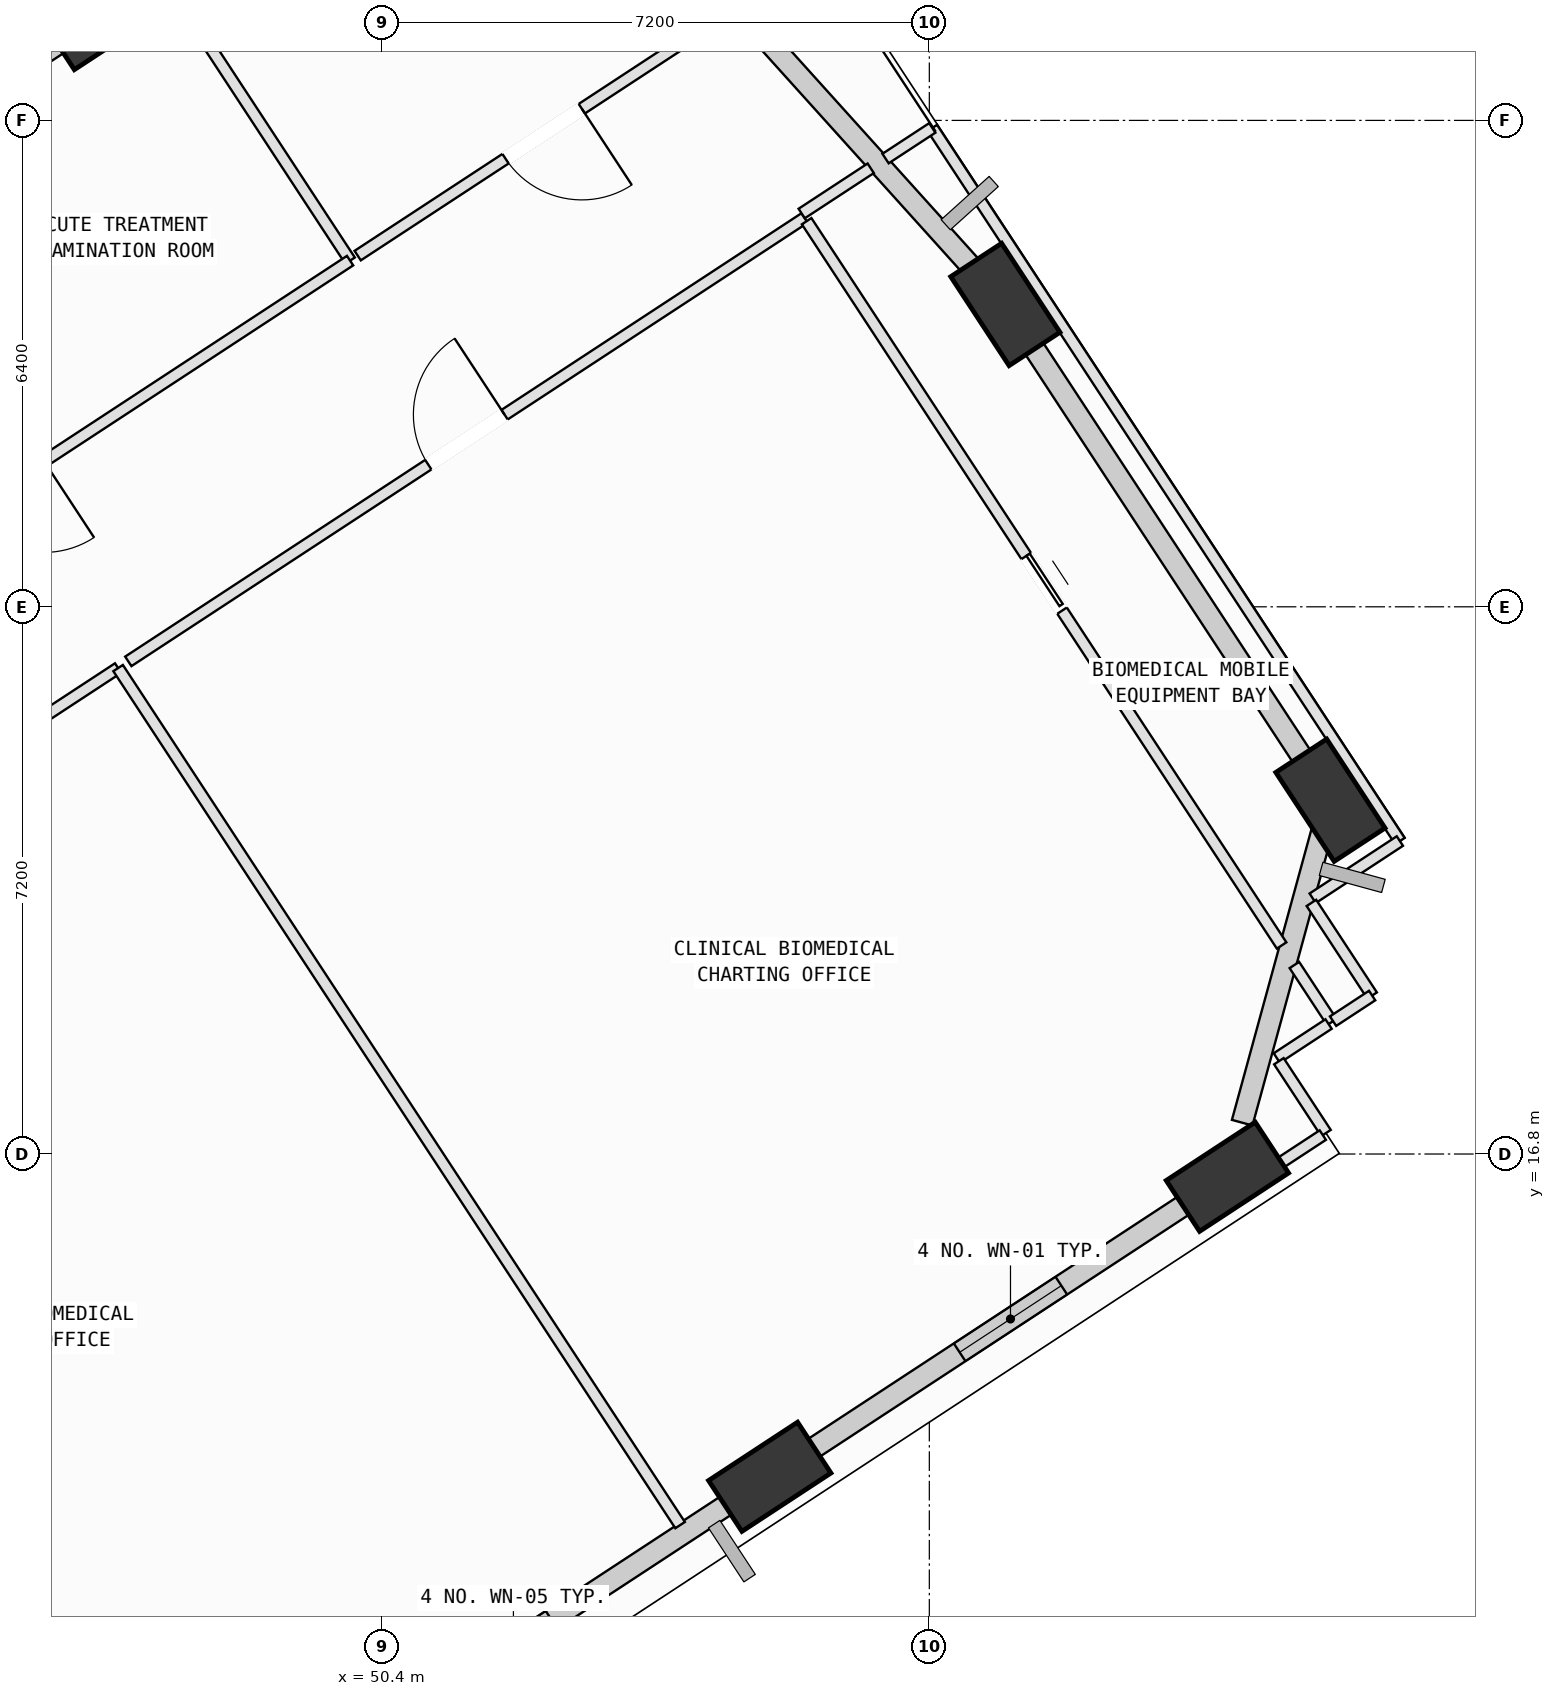
"""IFC4 building model, lengths in metres.
Left out: names, types, materials, properties, quantities, classifications, styles, units other than length and angle.
Written with IfcOpenShell. Run it as: python <this file> out.ifc"""

import sys

from ifc_helpers import new_model, si_unit, direction, frame, frame_2d, origin, origin_2d, place, context, subcontext, project, spatial, rectangle, extrude, element, fill, save


model = new_model("IFC4")
c1 = context("Model", 3, precision=1e-05, world=origin(), true_north=direction((0.0, 1.0)))
c2 = subcontext(c1, "Body", "Model", "MODEL_VIEW")
j1 = project(units=[si_unit("LENGTHUNIT", "METRE"), si_unit("PLANEANGLEUNIT", "RADIAN")], contexts=[c1])
p1 = place(None, origin())
s1 = spatial("IfcSite", under=j1, at=p1, CompositionType="ELEMENT")
p2 = place(p1, origin())
s2 = spatial("IfcBuilding", under=s1, at=p2, CompositionType="ELEMENT")
p3 = place(p2, frame((0.0, 0.0, 165.8)))
s3 = spatial("IfcBuildingStorey", under=s2, at=p3, CompositionType="ELEMENT", Elevation=165.8)
p4 = place(p3, frame((55.5, 12.553, 0.002), z_axis=(0.049765035184, 0.090719410903, 0.994632308825), x_axis=(-0.995498317814, -0.07592385374, 0.056733302946)))
e1 = element("IfcColumn", 1, at=p4, inside=s3, PredefinedType="COLUMN", context=c2, shape_type="SweptSolid", body=[
    extrude(rectangle(XDim=1.4, YDim=0.8, at=origin_2d()), origin(), (0.0, 0.0, 1.0), 4.018),
])
p5 = place(p3, frame((61.522, 16.501, 0.002), z_axis=(0.03323650567, 0.115175409247, 0.992788980497), x_axis=(-0.954422894609, -0.291130448803, 0.0657267071)))
e2 = element("IfcColumn", 2, at=p5, inside=s3, PredefinedType="COLUMN", context=c2, shape_type="SweptSolid", body=[
    extrude(rectangle(XDim=1.4, YDim=0.8, at=origin_2d()), origin(), (0.0, 0.0, 1.0), 4.025),
])
p6 = place(p3, frame((62.877, 21.455, 0.002), z_axis=(0.012795146098, 0.120553319632, 0.992624390876), x_axis=(0.457616826134, -0.883350587109, 0.101383335381)))
e3 = element("IfcColumn", 3, at=p6, inside=s3, PredefinedType="COLUMN", context=c2, shape_type="SweptSolid", body=[
    extrude(rectangle(XDim=1.4, YDim=0.8, at=origin_2d()), origin(), (0.0, 0.0, 1.0), 4.026),
])
p7 = place(p3, frame((58.601, 27.978, 0.002), z_axis=(-0.013974855089, 0.102988605982, 0.994584360657), x_axis=(0.65515298968, -0.750479814309, 0.086917250466)))
e4 = element("IfcColumn", 4, at=p7, inside=s3, PredefinedType="COLUMN", context=c2, shape_type="SweptSolid", body=[
    extrude(rectangle(XDim=1.4, YDim=0.8, at=origin_2d()), origin(), (0.0, 0.0, 1.0), 4.018),
])
p8 = place(p3, frame((46.717, 31.786, 0.002), z_axis=(-0.029390162986, 0.054024241505, 0.998107008116), x_axis=(-0.473093074248, -0.880366887856, 0.033720703821)))
e5 = element("IfcColumn", 5, at=p8, inside=s3, PredefinedType="COLUMN", context=c2, shape_type="SweptSolid", body=[
    extrude(rectangle(XDim=1.4, YDim=0.8, at=origin_2d()), origin(), (0.0, 0.0, 1.0), 4.004),
])
p9 = place(p3, frame((55.247, 12.387, 0.0), z_axis=(0.0, 0.0, 1.0), x_axis=(-0.836284210267, -0.548296197013, 0.0)))
e6 = element("IfcWall", 6, at=p9, inside=s3, PredefinedType="SOLIDWALL", context=c2, shape_type="SweptSolid", body=[
    extrude(rectangle(XDim=6.218, YDim=0.28, at=frame_2d((3.109, 0.0))), origin(), (0.0, 0.0, 1.0), 3.165),
])
p10 = place(p9, frame((3.13, 0.0, 0.75)))
e7 = element("IfcOpeningElement", 7, at=p10, cuts=e6, PredefinedType="OPENING", context=c2, shape_type="SweptSolid", body=[
    extrude(rectangle(XDim=1.2, YDim=1.75, at=frame_2d((0.6, 0.875))), frame((0.0, 0.15, 0.0), z_axis=(0.0, -1.0, 0.0), x_axis=(1.0, 0.0, 0.0)), (0.0, 0.0, 1.0), 0.3),
])
p11 = place(p3, frame((61.281, 16.343, 0.0), z_axis=(0.0, 0.0, 1.0), x_axis=(-0.836291699202, -0.548284774406, 0.0)))
e8 = element("IfcWall", 8, at=p11, inside=s3, PredefinedType="SOLIDWALL", context=c2, shape_type="SweptSolid", body=[
    extrude(rectangle(XDim=6.242, YDim=0.28, at=frame_2d((3.121, 0.0))), origin(), (0.0, 0.0, 1.0), 3.165),
])
p12 = place(p11, frame((2.325, 0.0, 0.75)))
e9 = element("IfcOpeningElement", 9, at=p12, cuts=e8, PredefinedType="OPENING", context=c2, shape_type="SweptSolid", body=[
    extrude(rectangle(XDim=1.6, YDim=1.95, at=frame_2d((0.8, 0.975))), frame((0.0, 0.15, 0.0), z_axis=(0.0, -1.0, 0.0), x_axis=(1.0, 0.0, 0.0)), (0.0, 0.0, 1.0), 0.3),
])
p13 = place(p3, frame((62.81, 21.21, 0.0), z_axis=(0.0, 0.0, 1.0), x_axis=(-0.263929675669, -0.964541925632, 0.0)))
e10 = element("IfcWall", 10, at=p13, inside=s3, PredefinedType="SOLIDWALL", context=c2, shape_type="SweptSolid", body=[
    extrude(rectangle(XDim=4.145, YDim=0.28, at=frame_2d((2.073, 0.0))), origin(), (0.0, 0.0, 1.0), 3.165),
])
p14 = place(p3, frame((58.765, 27.727, 0.0), z_axis=(0.0, 0.0, 1.0), x_axis=(0.548300082182, -0.836281663006, 0.0)))
e11 = element("IfcWall", 11, at=p14, inside=s3, PredefinedType="SOLIDWALL", context=c2, shape_type="SweptSolid", body=[
    extrude(rectangle(XDim=6.84, YDim=0.28, at=frame_2d((3.42, 0.0))), origin(), (0.0, 0.0, 1.0), 3.165),
])
p15 = place(p3, frame((52.244, 35.028, 0.0), z_axis=(0.0, 0.0, 1.0), x_axis=(0.669657355031, -0.742670200596, 0.0)))
e12 = element("IfcWall", 12, at=p15, inside=s3, PredefinedType="SOLIDWALL", context=c2, shape_type="SweptSolid", body=[
    extrude(rectangle(XDim=8.838, YDim=0.28, at=frame_2d((4.419, 0.0))), origin(), (0.0, 0.0, 1.0), 3.165),
])
p16 = place(p3, frame((44.206, 30.139, 0.0), z_axis=(0.0, 0.0, 1.0), x_axis=(0.836311759285, 0.548254175799, 0.0)))
e13 = element("IfcWall", 13, at=p16, inside=s3, PredefinedType="SOLIDWALL", context=c2, shape_type="SweptSolid", body=[
    extrude(rectangle(XDim=2.532, YDim=0.28, at=frame_2d((1.266, 0.0))), origin(), (0.0, 0.0, 1.0), 3.045),
])
p17 = place(p3, frame((41.23, 19.459, 0.0), z_axis=(0.0, 0.0, 1.0), x_axis=(0.836287739874, 0.548290813471, 0.0)))
e14 = element("IfcWall", 14, at=p17, inside=s3, PredefinedType="PARTITIONING", context=c2, shape_type="SweptSolid", body=[
    extrude(rectangle(XDim=6.812, YDim=0.15, at=frame_2d((3.406, 0.0))), origin(), (0.0, 0.0, 1.0), 3.065),
])
p18 = place(p17, frame((2.806, 0.0, 0.0)))
e15 = element("IfcOpeningElement", 15, at=p18, cuts=e14, PredefinedType="OPENING", context=c2, shape_type="SweptSolid", body=[
    extrude(rectangle(XDim=1.2, YDim=2.15, at=frame_2d((0.6, 1.075))), frame((0.0, 0.085, 0.0), z_axis=(0.0, -1.0, 0.0), x_axis=(1.0, 0.0, 0.0)), (0.0, 0.0, 1.0), 0.17),
])
p19 = place(p3, frame((46.927, 23.194, 0.0), z_axis=(0.0, 0.0, 1.0), x_axis=(0.54831669657, -0.836270769705, 0.0)))
e16 = element("IfcWall", 16, at=p19, inside=s3, PredefinedType="PARTITIONING", context=c2, shape_type="SweptSolid", body=[
    extrude(rectangle(XDim=13.485, YDim=0.15, at=frame_2d((6.743, 0.0))), origin(), (0.0, 0.0, 1.0), 3.415),
])
p20 = place(p3, frame((47.061, 23.282, 0.0), z_axis=(0.0, 0.0, 1.0), x_axis=(0.836276104337, 0.548308560315, 0.0)))
e17 = element("IfcWall", 17, at=p20, inside=s3, PredefinedType="PARTITIONING", context=c2, shape_type="SweptSolid", body=[
    extrude(rectangle(XDim=10.64, YDim=0.15, at=frame_2d((5.32, 0.0))), origin(), (0.0, 0.0, 1.0), 3.78),
])
p21 = place(p20, frame((4.72, 0.0, 0.0)))
e18 = element("IfcOpeningElement", 18, at=p21, cuts=e17, PredefinedType="OPENING", context=c2, shape_type="SweptSolid", body=[
    extrude(rectangle(XDim=1.2, YDim=2.15, at=frame_2d((0.6, 1.075))), frame((0.0, 0.085, 0.0), z_axis=(0.0, -1.0, 0.0), x_axis=(1.0, 0.0, 0.0)), (0.0, 0.0, 1.0), 0.17),
])
p22 = place(p3, frame((55.986, 29.074, 0.0), z_axis=(0.0, 0.0, 1.0), x_axis=(0.548346156001, -0.836251453332, 0.0)))
e19 = element("IfcWall", 19, at=p22, inside=s3, PredefinedType="PARTITIONING", context=c2, shape_type="SweptSolid", body=[
    extrude(rectangle(XDim=11.396, YDim=0.15, at=frame_2d((5.698, 0.0))), origin(), (0.0, 0.0, 1.0), 3.78),
])
p23 = place(p22, frame((5.268, 0.0, 0.0)))
e20 = element("IfcOpeningElement", 20, at=p23, cuts=e19, PredefinedType="OPENING", context=c2, shape_type="SweptSolid", body=[
    extrude(rectangle(XDim=0.86, YDim=2.06, at=frame_2d((0.43, 1.03))), frame((0.0, 0.085, 0.0), z_axis=(0.0, -1.0, 0.0), x_axis=(1.0, 0.0, 0.0)), (0.0, 0.0, 1.0), 0.17),
])
p24 = place(p3, frame((62.403, 19.287, 0.0), z_axis=(0.0, 0.0, 1.0), x_axis=(0.548466171821, -0.836172744335, 0.0)))
e21 = element("IfcWall", 21, at=p24, inside=s3, PredefinedType="PARTITIONING", context=c2, shape_type="SweptSolid", body=[
    extrude(rectangle(XDim=0.897, YDim=0.15, at=frame_2d((0.448, 0.0))), origin(), (0.0, 0.0, 1.0), 3.78),
])
p25 = place(p3, frame((62.853, 18.51, 0.0), z_axis=(0.0, 0.0, 1.0), x_axis=(-0.835949078194, -0.548807014046, 0.0)))
e22 = element("IfcWall", 22, at=p25, inside=s3, PredefinedType="PARTITIONING", context=c2, shape_type="SweptSolid", body=[
    extrude(rectangle(XDim=0.814, YDim=0.15, at=frame_2d((0.407, 0.0))), origin(), (0.0, 0.0, 1.0), 3.78),
])
p26 = place(p3, frame((62.199, 18.021, 0.0), z_axis=(0.0, 0.0, 1.0), x_axis=(0.548604544808, -0.836081965728, 0.0)))
e23 = element("IfcWall", 23, at=p26, inside=s3, PredefinedType="PARTITIONING", context=c2, shape_type="SweptSolid", body=[
    extrude(rectangle(XDim=1.13, YDim=0.15, at=frame_2d((0.565, 0.0))), origin(), (0.0, 0.0, 1.0), 3.78),
])
p27 = place(p3, frame((62.777, 17.049, 0.0), z_axis=(0.0, 0.0, 1.0), x_axis=(-0.836312696584, -0.548252746032, 0.0)))
e24 = element("IfcWall", 24, at=p27, inside=s3, PredefinedType="PARTITIONING", context=c2, shape_type="SweptSolid", body=[
    extrude(rectangle(XDim=1.638, YDim=0.15, at=frame_2d((0.819, 0.0))), origin(), (0.0, 0.0, 1.0), 3.78),
])
p28 = place(p3, frame((56.187, 12.728, 0.0), z_axis=(0.0, 0.0, 1.0), x_axis=(-0.836155745767, -0.54849208638, 0.0)))
e25 = element("IfcWall", 25, at=p28, inside=s3, PredefinedType="PARTITIONING", context=c2, shape_type="SweptSolid", body=[
    extrude(rectangle(XDim=0.973, YDim=0.15, at=frame_2d((0.487, 0.0))), origin(), (0.0, 0.0, 1.0), 3.165),
])
p29 = place(p3, frame((47.58, 32.214, 0.0), z_axis=(0.0, 0.0, 1.0), x_axis=(0.548271243698, -0.836300569971, 0.0)))
e26 = element("IfcWall", 26, at=p29, inside=s3, PredefinedType="PARTITIONING", context=c2, shape_type="SweptSolid", body=[
    extrude(rectangle(XDim=4.375, YDim=0.15, at=frame_2d((2.188, 0.0))), origin(), (0.0, 0.0, 1.0), 3.78),
])
p30 = place(p3, frame((49.979, 28.555, 0.0), z_axis=(0.0, 0.0, 1.0), x_axis=(-0.836298938049, -0.548273732927, 0.0)))
e27 = element("IfcWall", 27, at=p30, inside=s3, PredefinedType="PARTITIONING", context=c2, shape_type="SweptSolid", body=[
    extrude(rectangle(XDim=10.829, YDim=0.15, at=frame_2d((5.414, 0.0))), origin(), (0.0, 0.0, 1.0), 3.78),
])
p31 = place(p30, frame((4.814, 0.0, 0.0)))
e28 = element("IfcOpeningElement", 28, at=p31, cuts=e27, PredefinedType="OPENING", context=c2, shape_type="SweptSolid", body=[
    extrude(rectangle(XDim=1.2, YDim=2.15, at=frame_2d((0.6, 1.075))), frame((0.0, 0.085, 0.0), z_axis=(0.0, -1.0, 0.0), x_axis=(1.0, 0.0, 0.0)), (0.0, 0.0, 1.0), 0.17),
])
p32 = place(p3, frame((54.973, 31.829, 0.0), z_axis=(0.0, 0.0, 1.0), x_axis=(-0.836325905436, -0.548232596529, 0.0)))
e29 = element("IfcWall", 29, at=p32, inside=s3, PredefinedType="PARTITIONING", context=c2, shape_type="SweptSolid", body=[
    extrude(rectangle(XDim=5.852, YDim=0.15, at=frame_2d((2.926, 0.0))), origin(), (0.0, 0.0, 1.0), 3.78),
])
p33 = place(p32, frame((2.326, 0.0, 0.0)))
e30 = element("IfcOpeningElement", 30, at=p33, cuts=e29, PredefinedType="OPENING", context=c2, shape_type="SweptSolid", body=[
    extrude(rectangle(XDim=1.2, YDim=2.15, at=frame_2d((0.6, 1.075))), frame((0.0, 0.085, 0.0), z_axis=(0.0, -1.0, 0.0), x_axis=(1.0, 0.0, 0.0)), (0.0, 0.0, 1.0), 0.17),
])
p34 = place(p3, frame((57.639, 30.301, 0.0), z_axis=(0.0, 0.0, 1.0), x_axis=(0.548311811245, -0.83627397284, 0.0)))
e31 = element("IfcWall", 31, at=p34, inside=s3, PredefinedType="PARTITIONING", context=c2, shape_type="SweptSolid", body=[
    extrude(rectangle(XDim=11.22, YDim=0.15, at=frame_2d((5.61, 0.0))), origin(), (0.0, 0.0, 1.0), 3.165),
])
p35 = place(p3, frame((63.791, 20.918, 0.0), z_axis=(0.0, 0.0, 1.0), x_axis=(-0.835971381585, -0.548773039763, 0.0)))
e32 = element("IfcWall", 32, at=p35, inside=s3, PredefinedType="PARTITIONING", context=c2, shape_type="SweptSolid", body=[
    extrude(rectangle(XDim=1.372, YDim=0.15, at=frame_2d((0.686, 0.0))), origin(), (0.0, 0.0, 1.0), 3.78),
])
p36 = place(p3, frame((62.627, 20.104, 0.0), z_axis=(0.0, 0.0, 1.0), x_axis=(0.548228300685, -0.836328721454, 0.0)))
e33 = element("IfcWall", 33, at=p36, inside=s3, PredefinedType="PARTITIONING", context=c2, shape_type="SweptSolid", body=[
    extrude(rectangle(XDim=1.458, YDim=0.15, at=frame_2d((0.729, 0.0))), origin(), (0.0, 0.0, 1.0), 3.78),
])
p37 = place(p3, frame((63.426, 18.885, 0.0), z_axis=(0.0, 0.0, 1.0), x_axis=(-0.836304094671, -0.548265867291, 0.0)))
e34 = element("IfcWall", 34, at=p37, inside=s3, PredefinedType="PARTITIONING", context=c2, shape_type="SweptSolid", body=[
    extrude(rectangle(XDim=0.615, YDim=0.15, at=frame_2d((0.307, 0.0))), origin(), (0.0, 0.0, 1.0), 3.78),
])
p38 = place(p3, frame((55.921, 29.175, 0.0), z_axis=(0.0, 0.0, 1.0), x_axis=(0.836486009436, 0.547988280913, 0.0)))
e35 = element("IfcWall", 35, at=p38, inside=s3, PredefinedType="PARTITIONING", context=c2, shape_type="SweptSolid", body=[
    extrude(rectangle(XDim=1.086, YDim=0.15, at=frame_2d((0.543, 0.0))), origin(), (0.0, 0.0, 1.0), 3.78),
])
p39 = place(p3, frame((57.024, 29.898, 0.0), z_axis=(0.0, 0.0, 1.0), x_axis=(0.836366647965, 0.54817043898, 0.0)))
e36 = element("IfcWall", 36, at=p39, inside=s3, PredefinedType="PARTITIONING", context=c2, shape_type="SweptSolid", body=[
    extrude(rectangle(XDim=0.735, YDim=0.15, at=frame_2d((0.368, 0.0))), origin(), (0.0, 0.0, 1.0), 3.78),
])
p40 = place(p12, origin())
e37 = element("IfcWindow", 37, at=p40, inside=s3, PartitioningType="SINGLE_PANEL", PredefinedType="WINDOW", context=c2, shape_type="SweptSolid", body=[
    extrude(rectangle(XDim=1.6, YDim=1.95, at=frame_2d((0.8, 0.975))), frame((0.0, 0.03, 0.0), z_axis=(0.0, -1.0, 0.0), x_axis=(1.0, 0.0, 0.0)), (0.0, 0.0, 1.0), 0.06),
])
fill(e9, e37)
p41 = place(p21, origin())
e38 = element("IfcDoor", 38, at=p41, inside=s3, OperationType="SINGLE_SWING_RIGHT", PredefinedType="DOOR", context=c2, shape_type="SweptSolid", body=[
    extrude(rectangle(XDim=1.2, YDim=2.15, at=frame_2d((0.6, 1.075))), frame((0.0, 0.025, 0.0), z_axis=(0.0, -1.0, 0.0), x_axis=(1.0, 0.0, 0.0)), (0.0, 0.0, 1.0), 0.05),
])
fill(e18, e38)
p42 = place(p33, origin())
e39 = element("IfcDoor", 39, at=p42, inside=s3, OperationType="SINGLE_SWING_LEFT", PredefinedType="DOOR", context=c2, shape_type="SweptSolid", body=[
    extrude(rectangle(XDim=1.2, YDim=2.15, at=frame_2d((0.6, 1.075))), frame((0.0, 0.025, 0.0), z_axis=(0.0, -1.0, 0.0), x_axis=(1.0, 0.0, 0.0)), (0.0, 0.0, 1.0), 0.05),
])
fill(e30, e39)
p43 = place(p23, origin())
e40 = element("IfcDoor", 40, at=p43, inside=s3, OperationType="SLIDING_TO_LEFT", PredefinedType="DOOR", context=c2, shape_type="SweptSolid", body=[
    extrude(rectangle(XDim=0.86, YDim=2.06, at=frame_2d((0.43, 1.03))), frame((0.0, 0.025, 0.0), z_axis=(0.0, -1.0, 0.0), x_axis=(1.0, 0.0, 0.0)), (0.0, 0.0, 1.0), 0.05),
])
fill(e20, e40)
save(model, sys.argv[1])
